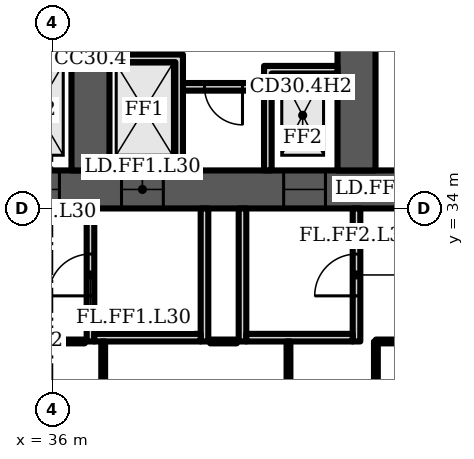
"""IFC4 building model, lengths in metres.
Left out: names, types, materials, properties, quantities, classifications, styles, units other than length and angle.
Written with IfcOpenShell. Run it as: python <this file> out.ifc"""

import sys

from ifc_helpers import new_model, si_unit, direction, frame, frame_2d, origin, place, context, subcontext, project, spatial, polyline, rectangle, outline, extrude, element, fill, save


model = new_model("IFC4")
c1 = context("Model", 3, precision=1e-05, world=origin(), true_north=direction((0.0, 1.0)))
c2 = subcontext(c1, "Body", "Model", "MODEL_VIEW")
j1 = project(units=[si_unit("LENGTHUNIT", "METRE"), si_unit("PLANEANGLEUNIT", "RADIAN")], contexts=[c1])
p1 = place(None, origin())
s1 = spatial("IfcSite", under=j1, at=p1, CompositionType="ELEMENT")
p2 = place(p1, origin())
s2 = spatial("IfcBuilding", under=s1, at=p2, CompositionType="ELEMENT")
p3 = place(p2, frame((0.0, 0.0, 129.1)))
s3 = spatial("IfcBuildingStorey", under=s2, at=p3, CompositionType="ELEMENT", Elevation=129.1)
p4 = place(p3, frame((16.0, 34.5, 0.0), z_axis=(0.0, 0.0, 1.0), x_axis=(1.0, 0.0, 0.0)))
e1 = element("IfcWall", 1, at=p4, inside=s3, PredefinedType="SHEAR", context=c2, shape_type="SweptSolid", body=[
    extrude(rectangle(XDim=49.0, YDim=1.0, at=frame_2d((24.5, 0.0))), origin(), (0.0, 0.0, 1.0), 3.6),
])
p5 = place(p4, frame((1.2, 0.0, 0.0)))
e2 = element("IfcOpeningElement", 2, at=p5, cuts=e1, PredefinedType="OPENING", context=c2, shape_type="SweptSolid", body=[
    extrude(rectangle(XDim=1.1, YDim=2.1, at=frame_2d((0.55, 1.05))), frame((0.0, 0.51, 0.0), z_axis=(0.0, -1.0, 0.0), x_axis=(1.0, 0.0, 0.0)), (0.0, 0.0, 1.0), 1.02),
])
p6 = place(p4, frame((5.083, 0.0, 0.0)))
e3 = element("IfcOpeningElement", 3, at=p6, cuts=e1, PredefinedType="OPENING", context=c2, shape_type="SweptSolid", body=[
    extrude(rectangle(XDim=1.1, YDim=2.1, at=frame_2d((0.55, 1.05))), frame((0.0, 0.51, 0.0), z_axis=(0.0, -1.0, 0.0), x_axis=(1.0, 0.0, 0.0)), (0.0, 0.0, 1.0), 1.02),
])
p7 = place(p4, frame((2.933, 0.0, 0.0)))
e4 = element("IfcOpeningElement", 4, at=p7, cuts=e1, PredefinedType="OPENING", context=c2, shape_type="SweptSolid", body=[
    extrude(rectangle(XDim=1.4, YDim=2.1, at=frame_2d((0.7, 1.05))), frame((0.0, 0.51, 0.0), z_axis=(0.0, -1.0, 0.0), x_axis=(1.0, 0.0, 0.0)), (0.0, 0.0, 1.0), 1.02),
])
p8 = place(p4, frame((7.65, 0.0, 0.0)))
e5 = element("IfcOpeningElement", 5, at=p8, cuts=e1, PredefinedType="OPENING", context=c2, shape_type="SweptSolid", body=[
    extrude(rectangle(XDim=1.2, YDim=2.1, at=frame_2d((0.6, 1.05))), frame((0.0, 0.51, 0.0), z_axis=(0.0, -1.0, 0.0), x_axis=(1.0, 0.0, 0.0)), (0.0, 0.0, 1.0), 1.02),
])
p9 = place(p4, frame((14.817, 0.0, 0.0)))
e6 = element("IfcOpeningElement", 6, at=p9, cuts=e1, PredefinedType="OPENING", context=c2, shape_type="SweptSolid", body=[
    extrude(rectangle(XDim=1.1, YDim=2.1, at=frame_2d((0.55, 1.05))), frame((0.0, 0.51, 0.0), z_axis=(0.0, -1.0, 0.0), x_axis=(1.0, 0.0, 0.0)), (0.0, 0.0, 1.0), 1.02),
])
p10 = place(p4, frame((19.083, 0.0, 0.0)))
e7 = element("IfcOpeningElement", 7, at=p10, cuts=e1, PredefinedType="OPENING", context=c2, shape_type="SweptSolid", body=[
    extrude(rectangle(XDim=1.1, YDim=2.1, at=frame_2d((0.55, 1.05))), frame((0.0, 0.51, 0.0), z_axis=(0.0, -1.0, 0.0), x_axis=(1.0, 0.0, 0.0)), (0.0, 0.0, 1.0), 1.02),
])
p11 = place(p4, frame((16.8, 0.0, 0.0)))
e8 = element("IfcOpeningElement", 8, at=p11, cuts=e1, PredefinedType="OPENING", context=c2, shape_type="SweptSolid", body=[
    extrude(rectangle(XDim=1.4, YDim=2.1, at=frame_2d((0.7, 1.05))), frame((0.0, 0.51, 0.0), z_axis=(0.0, -1.0, 0.0), x_axis=(1.0, 0.0, 0.0)), (0.0, 0.0, 1.0), 1.02),
])
p12 = place(p4, frame((21.817, 0.0, 0.0)))
e9 = element("IfcOpeningElement", 9, at=p12, cuts=e1, PredefinedType="OPENING", context=c2, shape_type="SweptSolid", body=[
    extrude(rectangle(XDim=1.1, YDim=2.1, at=frame_2d((0.55, 1.05))), frame((0.0, 0.51, 0.0), z_axis=(0.0, -1.0, 0.0), x_axis=(1.0, 0.0, 0.0)), (0.0, 0.0, 1.0), 1.02),
])
p13 = place(p4, frame((26.083, 0.0, 0.0)))
e10 = element("IfcOpeningElement", 10, at=p13, cuts=e1, PredefinedType="OPENING", context=c2, shape_type="SweptSolid", body=[
    extrude(rectangle(XDim=1.1, YDim=2.1, at=frame_2d((0.55, 1.05))), frame((0.0, 0.51, 0.0), z_axis=(0.0, -1.0, 0.0), x_axis=(1.0, 0.0, 0.0)), (0.0, 0.0, 1.0), 1.02),
])
p14 = place(p4, frame((33.15, 0.0, 0.0)))
e11 = element("IfcOpeningElement", 11, at=p14, cuts=e1, PredefinedType="OPENING", context=c2, shape_type="SweptSolid", body=[
    extrude(rectangle(XDim=1.2, YDim=2.1, at=frame_2d((0.6, 1.05))), frame((0.0, 0.51, 0.0), z_axis=(0.0, -1.0, 0.0), x_axis=(1.0, 0.0, 0.0)), (0.0, 0.0, 1.0), 1.02),
])
p15 = place(p4, frame((37.8, 0.0, 0.0)))
e12 = element("IfcOpeningElement", 12, at=p15, cuts=e1, PredefinedType="OPENING", context=c2, shape_type="SweptSolid", body=[
    extrude(rectangle(XDim=1.4, YDim=2.1, at=frame_2d((0.7, 1.05))), frame((0.0, 0.51, 0.0), z_axis=(0.0, -1.0, 0.0), x_axis=(1.0, 0.0, 0.0)), (0.0, 0.0, 1.0), 1.02),
])
p16 = place(p4, frame((42.817, 0.0, 0.0)))
e13 = element("IfcOpeningElement", 13, at=p16, cuts=e1, PredefinedType="OPENING", context=c2, shape_type="SweptSolid", body=[
    extrude(rectangle(XDim=1.1, YDim=2.1, at=frame_2d((0.55, 1.05))), frame((0.0, 0.51, 0.0), z_axis=(0.0, -1.0, 0.0), x_axis=(1.0, 0.0, 0.0)), (0.0, 0.0, 1.0), 1.02),
])
p17 = place(p4, frame((46.7, 0.0, 0.0)))
e14 = element("IfcOpeningElement", 14, at=p17, cuts=e1, PredefinedType="OPENING", context=c2, shape_type="SweptSolid", body=[
    extrude(rectangle(XDim=1.1, YDim=2.1, at=frame_2d((0.55, 1.05))), frame((0.0, 0.51, 0.0), z_axis=(0.0, -1.0, 0.0), x_axis=(1.0, 0.0, 0.0)), (0.0, 0.0, 1.0), 1.02),
])
p18 = place(p4, frame((44.667, 0.0, 0.0)))
e15 = element("IfcOpeningElement", 15, at=p18, cuts=e1, PredefinedType="OPENING", context=c2, shape_type="SweptSolid", body=[
    extrude(rectangle(XDim=1.4, YDim=2.1, at=frame_2d((0.7, 1.05))), frame((0.0, 0.51, 0.0), z_axis=(0.0, -1.0, 0.0), x_axis=(1.0, 0.0, 0.0)), (0.0, 0.0, 1.0), 1.02),
])
p19 = place(p3, frame((37.0, 35.0, 0.0), z_axis=(0.0, 0.0, 1.0), x_axis=(0.0, 1.0, 0.0)))
e16 = element("IfcWall", 16, at=p19, inside=s3, PredefinedType="SHEAR", context=c2, shape_type="SweptSolid", body=[
    extrude(rectangle(XDim=14.577, YDim=1.0, at=frame_2d((7.289, 0.0))), origin(), (0.0, 0.0, 1.0), 3.6),
])
p20 = place(p19, frame((3.4, 0.0, 0.0)))
e17 = element("IfcOpeningElement", 17, at=p20, cuts=e16, PredefinedType="OPENING", context=c2, shape_type="SweptSolid", body=[
    extrude(rectangle(XDim=1.1, YDim=2.1, at=frame_2d((0.55, 1.05))), frame((0.0, 0.51, 0.0), z_axis=(0.0, -1.0, 0.0), x_axis=(1.0, 0.0, 0.0)), (0.0, 0.0, 1.0), 1.02),
])
p21 = place(p19, frame((9.8, 0.0, 0.0)))
e18 = element("IfcOpeningElement", 18, at=p21, cuts=e16, PredefinedType="OPENING", context=c2, shape_type="SweptSolid", body=[
    extrude(rectangle(XDim=1.0, YDim=2.1, at=frame_2d((0.5, 1.05))), frame((0.0, 0.51, 0.0), z_axis=(0.0, -1.0, 0.0), x_axis=(1.0, 0.0, 0.0)), (0.0, 0.0, 1.0), 1.02),
])
p22 = place(p3, frame((44.0, 35.0, 0.0), z_axis=(0.0, 0.0, 1.0), x_axis=(0.0, 1.0, 0.0)))
e19 = element("IfcWall", 19, at=p22, inside=s3, PredefinedType="SHEAR", context=c2, shape_type="SweptSolid", body=[
    extrude(rectangle(XDim=14.577, YDim=1.0, at=frame_2d((7.289, 0.0))), origin(), (0.0, 0.0, 1.0), 3.6),
])
p23 = place(p22, frame((3.4, 0.0, 0.0)))
e20 = element("IfcOpeningElement", 20, at=p23, cuts=e19, PredefinedType="OPENING", context=c2, shape_type="SweptSolid", body=[
    extrude(rectangle(XDim=1.1, YDim=2.1, at=frame_2d((0.55, 1.05))), frame((0.0, 0.51, 0.0), z_axis=(0.0, -1.0, 0.0), x_axis=(1.0, 0.0, 0.0)), (0.0, 0.0, 1.0), 1.02),
])
p24 = place(p22, frame((9.8, 0.0, 0.0)))
e21 = element("IfcOpeningElement", 21, at=p24, cuts=e19, PredefinedType="OPENING", context=c2, shape_type="SweptSolid", body=[
    extrude(rectangle(XDim=1.0, YDim=2.1, at=frame_2d((0.5, 1.05))), frame((0.0, 0.51, 0.0), z_axis=(0.0, -1.0, 0.0), x_axis=(1.0, 0.0, 0.0)), (0.0, 0.0, 1.0), 1.02),
])
p25 = place(p3, frame((0.0, 0.0, -0.0)))
e22 = element("IfcWall", 22, at=p25, inside=s3, PredefinedType="PARTITIONING", context=c2, shape_type="SweptSolid", body=[
    extrude(outline(polyline([(34.567, 38.05), (34.767, 38.05), (36.5, 38.05), (36.5, 37.85), (34.767, 37.85), (34.767, 35.0), (34.567, 35.0), (34.567, 38.05)])), origin(), (0.0, 0.0, 1.0), 3.2),
])
p26 = place(p3, frame((39.433, 37.2, 0.0), z_axis=(0.0, 0.0, 1.0), x_axis=(1.0, 0.0, 0.0)))
e23 = element("IfcWall", 23, at=p26, inside=s3, PredefinedType="PARTITIONING", context=c2, shape_type="SweptSolid", body=[
    extrude(rectangle(XDim=2.133, YDim=0.2, at=frame_2d((1.067, 0.0))), origin(), (0.0, 0.0, 1.0), 3.2),
])
p27 = place(p26, frame((0.567, 0.0, 0.0)))
e24 = element("IfcOpeningElement", 24, at=p27, cuts=e23, PredefinedType="OPENING", context=c2, shape_type="SweptSolid", body=[
    extrude(rectangle(XDim=1.0, YDim=2.1, at=frame_2d((0.5, 1.05))), frame((0.0, 0.11, 0.0), z_axis=(0.0, -1.0, 0.0), x_axis=(1.0, 0.0, 0.0)), (0.0, 0.0, 1.0), 0.22),
])
p28 = place(p3, frame((0.0, 0.0, -0.0)))
e25 = element("IfcWall", 25, at=p28, inside=s3, PredefinedType="PARTITIONING", context=c2, shape_type="SweptSolid", body=[
    extrude(outline(polyline([(41.567, 37.75), (41.767, 37.75), (43.5, 37.75), (43.5, 37.55), (41.767, 37.55), (41.767, 35.0), (41.567, 35.0), (41.567, 37.75)])), origin(), (0.0, 0.0, 1.0), 3.2),
])
p29 = place(p3, frame((0.0, 0.0, -0.0)))
e26 = element("IfcWall", 26, at=p29, inside=s3, PredefinedType="PARTITIONING", context=c2, shape_type="SweptSolid", body=[
    extrude(outline(polyline([(39.233, 37.85), (37.5, 37.85), (37.5, 38.05), (39.233, 38.05), (39.433, 38.05), (39.433, 35.0), (39.233, 35.0), (39.233, 37.85)])), origin(), (0.0, 0.0, 1.0), 3.2),
])
p30 = place(p3, frame((37.0, 30.5, 0.0), z_axis=(0.0, 0.0, 1.0), x_axis=(0.0, 1.0, 0.0)))
e27 = element("IfcWall", 27, at=p30, inside=s3, PredefinedType="PARTITIONING", context=c2, shape_type="SweptSolid", body=[
    extrude(rectangle(XDim=3.5, YDim=0.2, at=frame_2d((1.75, 0.0))), origin(), (0.0, 0.0, 1.0), 3.2),
])
p31 = place(p30, frame((1.2, 0.0, 0.0)))
e28 = element("IfcOpeningElement", 28, at=p31, cuts=e27, PredefinedType="OPENING", context=c2, shape_type="SweptSolid", body=[
    extrude(rectangle(XDim=1.1, YDim=2.1, at=frame_2d((0.55, 1.05))), frame((0.0, 0.11, 0.0), z_axis=(0.0, -1.0, 0.0), x_axis=(1.0, 0.0, 0.0)), (0.0, 0.0, 1.0), 0.22),
])
p32 = place(p3, frame((40.0, 30.5, 0.0), z_axis=(0.0, 0.0, 1.0), x_axis=(0.0, 1.0, 0.0)))
e29 = element("IfcWall", 29, at=p32, inside=s3, PredefinedType="PARTITIONING", context=c2, shape_type="SweptSolid", body=[
    extrude(rectangle(XDim=3.5, YDim=0.2, at=frame_2d((1.75, 0.0))), origin(), (0.0, 0.0, 1.0), 3.2),
])
p33 = place(p3, frame((37.1, 30.6, 0.0), z_axis=(0.0, 0.0, 1.0), x_axis=(1.0, 0.0, 0.0)))
e30 = element("IfcWall", 30, at=p33, inside=s3, PredefinedType="PARTITIONING", context=c2, shape_type="SweptSolid", body=[
    extrude(rectangle(XDim=2.8, YDim=0.2, at=frame_2d((1.4, 0.0))), origin(), (0.0, 0.0, 1.0), 3.2),
])
p34 = place(p3, frame((41.0, 30.5, 0.0), z_axis=(0.0, 0.0, 1.0), x_axis=(0.0, 1.0, 0.0)))
e31 = element("IfcWall", 31, at=p34, inside=s3, PredefinedType="PARTITIONING", context=c2, shape_type="SweptSolid", body=[
    extrude(rectangle(XDim=3.5, YDim=0.2, at=frame_2d((1.75, 0.0))), origin(), (0.0, 0.0, 1.0), 3.2),
])
p35 = place(p3, frame((44.0, 30.5, 0.0), z_axis=(0.0, 0.0, 1.0), x_axis=(0.0, 1.0, 0.0)))
e32 = element("IfcWall", 32, at=p35, inside=s3, PredefinedType="PARTITIONING", context=c2, shape_type="SweptSolid", body=[
    extrude(rectangle(XDim=3.5, YDim=0.2, at=frame_2d((1.75, 0.0))), origin(), (0.0, 0.0, 1.0), 3.2),
])
p36 = place(p35, frame((1.2, 0.0, 0.0)))
e33 = element("IfcOpeningElement", 33, at=p36, cuts=e32, PredefinedType="OPENING", context=c2, shape_type="SweptSolid", body=[
    extrude(rectangle(XDim=1.1, YDim=2.1, at=frame_2d((0.55, 1.05))), frame((0.0, 0.11, 0.0), z_axis=(0.0, -1.0, 0.0), x_axis=(1.0, 0.0, 0.0)), (0.0, 0.0, 1.0), 0.22),
])
p37 = place(p3, frame((41.1, 30.6, 0.0), z_axis=(0.0, 0.0, 1.0), x_axis=(1.0, 0.0, 0.0)))
e34 = element("IfcWall", 34, at=p37, inside=s3, PredefinedType="PARTITIONING", context=c2, shape_type="SweptSolid", body=[
    extrude(rectangle(XDim=2.8, YDim=0.2, at=frame_2d((1.4, 0.0))), origin(), (0.0, 0.0, 1.0), 3.2),
])
p38 = place(p3, frame((17.8, 30.5, 0.0), z_axis=(0.0, 0.0, 1.0), x_axis=(1.0, 0.0, 0.0)))
e35 = element("IfcWall", 35, at=p38, inside=s3, PredefinedType="PARTITIONING", context=c2, shape_type="SweptSolid", body=[
    extrude(rectangle(XDim=19.05, YDim=0.1, at=frame_2d((9.525, 0.0))), origin(), (0.0, 0.0, 1.0), 3.2),
])
p39 = place(p38, frame((2.9, 0.0, 0.0)))
e36 = element("IfcOpeningElement", 36, at=p39, cuts=e35, PredefinedType="OPENING", context=c2, shape_type="SweptSolid", body=[
    extrude(rectangle(XDim=1.8, YDim=2.1, at=frame_2d((0.9, 1.05))), frame((0.0, 0.06, 0.0), z_axis=(0.0, -1.0, 0.0), x_axis=(1.0, 0.0, 0.0)), (0.0, 0.0, 1.0), 0.12),
])
p40 = place(p38, frame((9.99, 0.0, 0.0)))
e37 = element("IfcOpeningElement", 37, at=p40, cuts=e35, PredefinedType="OPENING", context=c2, shape_type="SweptSolid", body=[
    extrude(rectangle(XDim=1.0, YDim=2.1, at=frame_2d((0.5, 1.05))), frame((0.0, 0.06, 0.0), z_axis=(0.0, -1.0, 0.0), x_axis=(1.0, 0.0, 0.0)), (0.0, 0.0, 1.0), 0.12),
])
p41 = place(p38, frame((15.75, 0.0, 0.0)))
e38 = element("IfcOpeningElement", 38, at=p41, cuts=e35, PredefinedType="OPENING", context=c2, shape_type="SweptSolid", body=[
    extrude(rectangle(XDim=1.0, YDim=2.1, at=frame_2d((0.5, 1.05))), frame((0.0, 0.06, 0.0), z_axis=(0.0, -1.0, 0.0), x_axis=(1.0, 0.0, 0.0)), (0.0, 0.0, 1.0), 0.12),
])
p42 = place(p3, frame((37.335, 0.055, 0.0), z_axis=(0.0, 0.0, 1.0), x_axis=(0.0, 1.0, 0.0)))
e39 = element("IfcWall", 39, at=p42, inside=s3, PredefinedType="PARTITIONING", context=c2, shape_type="SweptSolid", body=[
    extrude(rectangle(XDim=30.445, YDim=0.1, at=frame_2d((15.223, 0.0))), origin(), (0.0, 0.0, 1.0), 3.2),
])
p43 = place(p3, frame((42.21, 8.437, 0.0), z_axis=(0.0, 0.0, 1.0), x_axis=(0.0, 1.0, 0.0)))
e40 = element("IfcWall", 40, at=p43, inside=s3, PredefinedType="PARTITIONING", context=c2, shape_type="SweptSolid", body=[
    extrude(rectangle(XDim=22.063, YDim=0.1, at=frame_2d((11.031, 0.0))), origin(), (0.0, 0.0, 1.0), 3.2),
])
p44 = place(p43, frame((10.143, 0.0, 0.0)))
e41 = element("IfcOpeningElement", 41, at=p44, cuts=e40, PredefinedType="OPENING", context=c2, shape_type="SweptSolid", body=[
    extrude(rectangle(XDim=1.8, YDim=2.1, at=frame_2d((0.9, 1.05))), frame((0.0, 0.06, 0.0), z_axis=(0.0, -1.0, 0.0), x_axis=(1.0, 0.0, 0.0)), (0.0, 0.0, 1.0), 0.12),
])
p45 = place(p3, frame((44.51, 8.437, 0.0), z_axis=(0.0, 0.0, 1.0), x_axis=(0.0, 1.0, 0.0)))
e42 = element("IfcWall", 42, at=p45, inside=s3, PredefinedType="PARTITIONING", context=c2, shape_type="SweptSolid", body=[
    extrude(rectangle(XDim=22.063, YDim=0.1, at=frame_2d((11.031, 0.0))), origin(), (0.0, 0.0, 1.0), 3.2),
])
p46 = place(p45, frame((12.683, 0.0, 0.0)))
e43 = element("IfcOpeningElement", 43, at=p46, cuts=e42, PredefinedType="OPENING", context=c2, shape_type="SweptSolid", body=[
    extrude(rectangle(XDim=1.8, YDim=2.1, at=frame_2d((0.9, 1.05))), frame((0.0, 0.06, 0.0), z_axis=(0.0, -1.0, 0.0), x_axis=(1.0, 0.0, 0.0)), (0.0, 0.0, 1.0), 0.12),
])
p47 = place(p3, frame((44.51, 30.5, 0.0), z_axis=(0.0, 0.0, 1.0), x_axis=(1.0, 0.0, 0.0)))
e44 = element("IfcWall", 44, at=p47, inside=s3, PredefinedType="PARTITIONING", context=c2, shape_type="SweptSolid", body=[
    extrude(rectangle(XDim=19.59, YDim=0.1, at=frame_2d((9.795, 0.0))), origin(), (0.0, 0.0, 1.0), 3.2),
])
p48 = place(p47, frame((6.41, 0.0, 0.0)))
e45 = element("IfcOpeningElement", 45, at=p48, cuts=e44, PredefinedType="OPENING", context=c2, shape_type="SweptSolid", body=[
    extrude(rectangle(XDim=1.0, YDim=2.1, at=frame_2d((0.5, 1.05))), frame((0.0, 0.06, 0.0), z_axis=(0.0, -1.0, 0.0), x_axis=(1.0, 0.0, 0.0)), (0.0, 0.0, 1.0), 0.12),
])
p49 = place(p47, frame((10.41, 0.0, 0.0)))
e46 = element("IfcOpeningElement", 46, at=p49, cuts=e44, PredefinedType="OPENING", context=c2, shape_type="SweptSolid", body=[
    extrude(rectangle(XDim=1.0, YDim=2.1, at=frame_2d((0.5, 1.05))), frame((0.0, 0.06, 0.0), z_axis=(0.0, -1.0, 0.0), x_axis=(1.0, 0.0, 0.0)), (0.0, 0.0, 1.0), 0.12),
])
p50 = place(p3, frame((40.15, 30.5, 0.0), z_axis=(0.0, 0.0, 1.0), x_axis=(1.0, 0.0, 0.0)))
e47 = element("IfcWall", 47, at=p50, inside=s3, PredefinedType="PARTITIONING", context=c2, shape_type="SweptSolid", body=[
    extrude(rectangle(XDim=0.7, YDim=0.1, at=frame_2d((0.35, 0.0))), origin(), (0.0, 0.0, 1.0), 3.2),
])
p51 = place(p10, origin())
e48 = element("IfcDoor", 48, at=p51, inside=s3, OperationType="DOUBLE_DOOR_SLIDING", PredefinedType="DOOR", context=c2, shape_type="SweptSolid", body=[
    extrude(rectangle(XDim=1.1, YDim=2.1, at=frame_2d((0.55, 1.05))), frame((0.0, 0.025, 0.0), z_axis=(0.0, -1.0, 0.0), x_axis=(1.0, 0.0, 0.0)), (0.0, 0.0, 1.0), 0.05),
])
fill(e7, e48)
p52 = place(p27, origin())
e49 = element("IfcDoor", 49, at=p52, inside=s3, OperationType="SINGLE_SWING_RIGHT", PredefinedType="DOOR", context=c2, shape_type="SweptSolid", body=[
    extrude(rectangle(XDim=1.0, YDim=2.1, at=frame_2d((0.5, 1.05))), frame((0.0, 0.025, 0.0), z_axis=(0.0, -1.0, 0.0), x_axis=(1.0, 0.0, 0.0)), (0.0, 0.0, 1.0), 0.05),
])
fill(e24, e49)
p53 = place(p12, origin())
e50 = element("IfcDoor", 50, at=p53, inside=s3, OperationType="DOUBLE_DOOR_SLIDING", PredefinedType="DOOR", context=c2, shape_type="SweptSolid", body=[
    extrude(rectangle(XDim=1.1, YDim=2.1, at=frame_2d((0.55, 1.05))), frame((0.0, 0.025, 0.0), z_axis=(0.0, -1.0, 0.0), x_axis=(1.0, 0.0, 0.0)), (0.0, 0.0, 1.0), 0.05),
])
fill(e9, e50)
p54 = place(p13, origin())
e51 = element("IfcDoor", 51, at=p54, inside=s3, OperationType="DOUBLE_DOOR_SLIDING", PredefinedType="DOOR", context=c2, shape_type="SweptSolid", body=[
    extrude(rectangle(XDim=1.1, YDim=2.1, at=frame_2d((0.55, 1.05))), frame((0.0, 0.025, 0.0), z_axis=(0.0, -1.0, 0.0), x_axis=(1.0, 0.0, 0.0)), (0.0, 0.0, 1.0), 0.05),
])
fill(e10, e51)
p55 = place(p31, origin())
e52 = element("IfcDoor", 52, at=p55, inside=s3, OperationType="SINGLE_SWING_LEFT", PredefinedType="DOOR", context=c2, shape_type="SweptSolid", body=[
    extrude(rectangle(XDim=1.1, YDim=2.1, at=frame_2d((0.55, 1.05))), frame((0.0, 0.025, 0.0), z_axis=(0.0, -1.0, 0.0), x_axis=(1.0, 0.0, 0.0)), (0.0, 0.0, 1.0), 0.05),
])
fill(e28, e52)
p56 = place(p36, origin())
e53 = element("IfcDoor", 53, at=p56, inside=s3, OperationType="SINGLE_SWING_LEFT", PredefinedType="DOOR", context=c2, shape_type="SweptSolid", body=[
    extrude(rectangle(XDim=1.1, YDim=2.1, at=frame_2d((0.55, 1.05))), frame((0.0, 0.025, 0.0), z_axis=(0.0, -1.0, 0.0), x_axis=(1.0, 0.0, 0.0)), (0.0, 0.0, 1.0), 0.05),
])
fill(e33, e53)
save(model, sys.argv[1])
